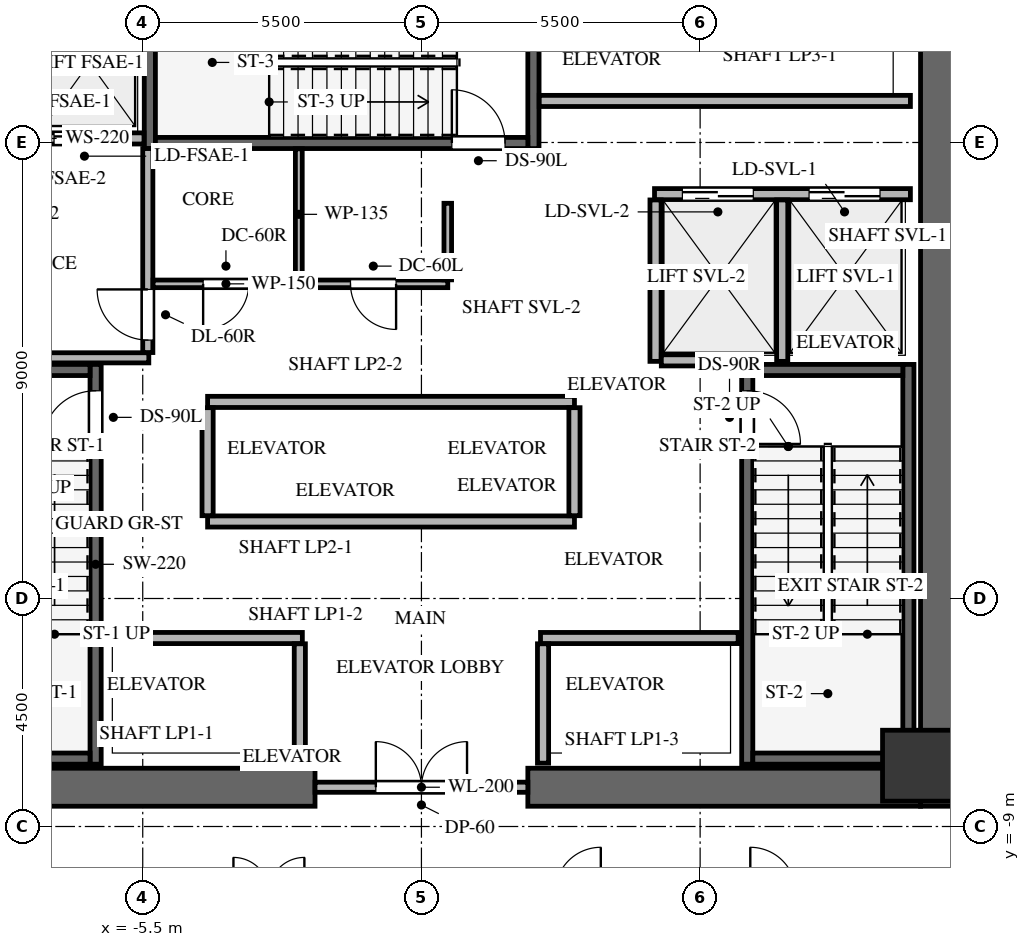
"""IFC4 building model, lengths in metres.
Left out: names, types, materials, properties, quantities, classifications, styles, units other than length and angle.
Written with IfcOpenShell. Run it as: python <this file> out.ifc"""

import sys

from ifc_helpers import new_model, si_unit, direction, frame, frame_2d, origin, origin_2d, place, context, subcontext, project, spatial, rectangle, extrude, source, transform, mapped, element, fill, save


model = new_model("IFC4")
c1 = context("Model", 3, precision=1e-05, world=origin(), true_north=direction((0.0, 1.0)))
c2 = subcontext(c1, "Body", "Model", "MODEL_VIEW")
j1 = project(units=[si_unit("LENGTHUNIT", "METRE"), si_unit("PLANEANGLEUNIT", "RADIAN")], contexts=[c1])
p1 = place(None, origin())
s1 = spatial("IfcSite", under=j1, at=p1, CompositionType="ELEMENT")
p2 = place(p1, origin())
s2 = spatial("IfcBuilding", under=s1, at=p2, CompositionType="ELEMENT")
p3 = place(p2, frame((0.0, 0.0, 88.5)))
s3 = spatial("IfcBuildingStorey", under=s2, at=p3, CompositionType="ELEMENT", Elevation=88.5)
p4 = place(p3, frame((10.225, -8.6, 0.0), z_axis=(0.0, 0.0, 1.0), x_axis=(0.0, 1.0, 0.0)))
e1 = element("IfcWall", 1, at=p4, inside=s3, PredefinedType="SHEAR", context=c2, shape_type="SweptSolid", body=[
    extrude(rectangle(XDim=17.2, YDim=0.75, at=frame_2d((8.6, 0.0))), origin(), (0.0, 0.0, 1.0), 4.8),
])
for number, where, z_axis, x_axis in (
    (2, (-9.85, -8.225, 0.0), (0.0, 0.0, 1.0), (1.0, 0.0, 0.0)),
    (3, (2.1, -8.225, 0.0), (0.0, 0.0, 1.0), (1.0, 0.0, 0.0)),
):
    element("IfcWall", number, at=place(p3, frame(where, z_axis=z_axis, x_axis=x_axis)), inside=s3, PredefinedType="SHEAR", context=c2, shape_type="SweptSolid", body=[
        extrude(rectangle(XDim=7.75, YDim=0.75, at=frame_2d((3.875, 0.0))), origin(), (0.0, 0.0, 1.0), 4.8),
    ])
p5 = place(p3, frame((-6.43, -7.77, -0.3), z_axis=(0.0, 0.0, 1.0), x_axis=(0.0, 1.0, 0.0)))
e4 = element("IfcWall", 4, at=p5, inside=s3, PredefinedType="SHEAR", context=c2, shape_type="SweptSolid", body=[
    extrude(rectangle(XDim=7.89, YDim=0.22, at=frame_2d((3.945, 0.0))), origin(), (0.0, 0.0, 1.0), 4.8),
])
p6 = place(p5, frame((6.32, 0.0, 0.0)))
e5 = element("IfcOpeningElement", 5, at=p6, cuts=e4, PredefinedType="OPENING", context=c2, shape_type="SweptSolid", body=[
    extrude(rectangle(XDim=1.05, YDim=2.15, at=frame_2d((0.525, 1.075))), frame((0.0, 0.12, 0.0), z_axis=(0.0, -1.0, 0.0), x_axis=(1.0, 0.0, 0.0)), (0.0, 0.0, 1.0), 0.24),
])
for number, where, z_axis, x_axis in (
    (6, (-9.5, -7.66, -0.3), (0.0, 0.0, 1.0), (1.0, 0.0, 0.0)),
    (7, (-6.54, 0.01, -0.3), (0.0, 0.0, 1.0), (-1.0, 0.0, 0.0)),
):
    element("IfcWall", number, at=place(p3, frame(where, z_axis=z_axis, x_axis=x_axis)), inside=s3, PredefinedType="SHEAR", context=c2, shape_type="SweptSolid", body=[
        extrude(rectangle(XDim=2.96, YDim=0.22, at=frame_2d((1.48, 0.0))), origin(), (0.0, 0.0, 1.0), 4.8),
    ])
p7 = place(p3, frame((9.61, -7.77, -0.3), z_axis=(0.0, 0.0, 1.0), x_axis=(0.0, 1.0, 0.0)))
e8 = element("IfcWall", 8, at=p7, inside=s3, PredefinedType="SHEAR", context=c2, shape_type="SweptSolid", body=[
    extrude(rectangle(XDim=7.89, YDim=0.22, at=frame_2d((3.945, 0.0))), origin(), (0.0, 0.0, 1.0), 4.8),
])
p8 = place(p3, frame((6.43, 0.12, -0.3), z_axis=(0.0, 0.0, 1.0), x_axis=(0.0, -1.0, 0.0)))
e9 = element("IfcWall", 9, at=p8, inside=s3, PredefinedType="SHEAR", context=c2, shape_type="SweptSolid", body=[
    extrude(rectangle(XDim=7.89, YDim=0.22, at=frame_2d((3.945, 0.0))), origin(), (0.0, 0.0, 1.0), 4.8),
])
p9 = place(p8, frame((0.52, 0.0, 0.0)))
e10 = element("IfcOpeningElement", 10, at=p9, cuts=e9, PredefinedType="OPENING", context=c2, shape_type="SweptSolid", body=[
    extrude(rectangle(XDim=1.05, YDim=2.15, at=frame_2d((0.525, 1.075))), frame((0.0, 0.12, 0.0), z_axis=(0.0, -1.0, 0.0), x_axis=(1.0, 0.0, 0.0)), (0.0, 0.0, 1.0), 0.24),
])
for number, where, z_axis, x_axis in (
    (11, (6.54, -7.66, -0.3), (0.0, 0.0, 1.0), (1.0, 0.0, 0.0)),
    (12, (9.5, 0.01, -0.3), (0.0, 0.0, 1.0), (-1.0, 0.0, 0.0)),
):
    element("IfcWall", number, at=place(p3, frame(where, z_axis=z_axis, x_axis=x_axis)), inside=s3, PredefinedType="SHEAR", context=c2, shape_type="SweptSolid", body=[
        extrude(rectangle(XDim=2.96, YDim=0.22, at=frame_2d((1.48, 0.0))), origin(), (0.0, 0.0, 1.0), 4.8),
    ])
for number, where, z_axis, x_axis in (
    (13, (2.21, 4.38, -0.3), (0.0, 0.0, 1.0), (0.0, 1.0, 0.0)),
    (14, (-5.36, 7.78, -0.3), (0.0, 0.0, 1.0), (0.0, -1.0, 0.0)),
):
    element("IfcWall", number, at=place(p3, frame(where, z_axis=z_axis, x_axis=x_axis)), inside=s3, PredefinedType="SHEAR", context=c2, shape_type="SweptSolid", body=[
        extrude(rectangle(XDim=3.4, YDim=0.22, at=frame_2d((1.7, 0.0))), origin(), (0.0, 0.0, 1.0), 4.8),
    ])
p10 = place(p3, frame((-5.25, 4.49, -0.3), z_axis=(0.0, 0.0, 1.0), x_axis=(1.0, 0.0, 0.0)))
e15 = element("IfcWall", 15, at=p10, inside=s3, PredefinedType="SHEAR", context=c2, shape_type="SweptSolid", body=[
    extrude(rectangle(XDim=7.35, YDim=0.22, at=frame_2d((3.675, 0.0))), origin(), (0.0, 0.0, 1.0), 4.8),
])
p11 = place(p10, frame((5.85, 0.0, 0.0)))
e16 = element("IfcOpeningElement", 16, at=p11, cuts=e15, PredefinedType="OPENING", context=c2, shape_type="SweptSolid", body=[
    extrude(rectangle(XDim=1.05, YDim=2.15, at=frame_2d((0.525, 1.075))), frame((0.0, 0.12, 0.0), z_axis=(0.0, -1.0, 0.0), x_axis=(1.0, 0.0, 0.0)), (0.0, 0.0, 1.0), 0.24),
])
m1 = source(origin(), c2, "Body", "SweptSolid", [
    extrude(rectangle(XDim=1.4, YDim=1.4, at=origin_2d()), origin(), (0.0, 0.0, 1.0), 4.8),
])
p12 = place(p3, frame((9.8, -7.8, -0.3), z_axis=(0.0, 0.0, 1.0), x_axis=(1.0, 0.0, 0.0)))
e17 = element("IfcColumn", 17, at=p12, inside=s3, PredefinedType="COLUMN", context=c2, shape_type="MappedRepresentation", body=[
    mapped(m1, transform((0.0, 0.0, 0.0), x_axis=(1.0, 0.0, 0.0), y_axis=(0.0, 1.0, 0.0), z_axis=(0.0, 0.0, 1.0), scale=1.0)),
])
p13 = place(p3, frame((-2.1, -8.225, 0.0), z_axis=(0.0, 0.0, 1.0), x_axis=(1.0, 0.0, 0.0)))
e18 = element("IfcWall", 18, at=p13, inside=s3, PredefinedType="SOLIDWALL", context=c2, shape_type="SweptSolid", body=[
    extrude(rectangle(XDim=4.2, YDim=0.2, at=frame_2d((2.1, 0.0))), origin(), (0.0, 0.0, 1.0), 4.485),
])
p14 = place(p13, frame((1.2, 0.0, 0.0)))
e19 = element("IfcOpeningElement", 19, at=p14, cuts=e18, PredefinedType="OPENING", context=c2, shape_type="SweptSolid", body=[
    extrude(rectangle(XDim=1.8, YDim=2.15, at=frame_2d((0.9, 1.075))), frame((0.0, 0.11, 0.0), z_axis=(0.0, -1.0, 0.0), x_axis=(1.0, 0.0, 0.0)), (0.0, 0.0, 1.0), 0.22),
])
p15 = place(p3, frame((-9.65, 4.58, 0.0), z_axis=(0.0, 0.0, 1.0), x_axis=(1.0, 0.0, 0.0)))
e20 = element("IfcWall", 20, at=p15, inside=s3, PredefinedType="SOLIDWALL", context=c2, shape_type="SweptSolid", body=[
    extrude(rectangle(XDim=4.175, YDim=0.22, at=frame_2d((2.087, 0.0))), origin(), (0.0, 0.0, 1.0), 4.485),
])
p16 = place(p15, frame((0.4, 0.0, 0.0)))
e21 = element("IfcOpeningElement", 21, at=p16, cuts=e20, PredefinedType="OPENING", context=c2, shape_type="SweptSolid", body=[
    extrude(rectangle(XDim=1.2, YDim=2.15, at=frame_2d((0.6, 1.075))), frame((0.0, 0.12, 0.0), z_axis=(0.0, -1.0, 0.0), x_axis=(1.0, 0.0, 0.0)), (0.0, 0.0, 1.0), 0.24),
])
p17 = place(p15, frame((2.4, 0.0, 0.0)))
e22 = element("IfcOpeningElement", 22, at=p17, cuts=e20, PredefinedType="OPENING", context=c2, shape_type="SweptSolid", body=[
    extrude(rectangle(XDim=1.2, YDim=2.15, at=frame_2d((0.6, 1.075))), frame((0.0, 0.12, 0.0), z_axis=(0.0, -1.0, 0.0), x_axis=(1.0, 0.0, 0.0)), (0.0, 0.0, 1.0), 0.24),
])
p18 = place(p3, frame((-9.65, 0.25, 0.0), z_axis=(0.0, 0.0, 1.0), x_axis=(1.0, 0.0, 0.0)))
e23 = element("IfcWall", 23, at=p18, inside=s3, PredefinedType="SOLIDWALL", context=c2, shape_type="SweptSolid", body=[
    extrude(rectangle(XDim=4.27, YDim=0.2, at=frame_2d((2.135, 0.0))), origin(), (0.0, 0.0, 1.0), 4.485),
])
p19 = place(p3, frame((-5.4, 0.354, 0.0), z_axis=(0.0, 0.0, 1.0), x_axis=(0.0, 1.0, 0.0)))
e24 = element("IfcWall", 24, at=p19, inside=s3, PredefinedType="SOLIDWALL", context=c2, shape_type="SweptSolid", body=[
    extrude(rectangle(XDim=4.026, YDim=0.2, at=frame_2d((2.013, 0.0))), origin(), (0.0, 0.0, 1.0), 4.485),
])
p20 = place(p19, frame((0.246, 0.0, 0.0)))
e25 = element("IfcOpeningElement", 25, at=p20, cuts=e24, PredefinedType="OPENING", context=c2, shape_type="SweptSolid", body=[
    extrude(rectangle(XDim=1.0, YDim=2.15, at=frame_2d((0.5, 1.075))), frame((0.0, 0.11, 0.0), z_axis=(0.0, -1.0, 0.0), x_axis=(1.0, 0.0, 0.0)), (0.0, 0.0, 1.0), 0.22),
])
p21 = place(p3, frame((4.6, 3.48, 0.0), z_axis=(0.0, 0.0, 1.0), x_axis=(1.0, 0.0, 0.0)))
e26 = element("IfcWall", 26, at=p21, inside=s3, PredefinedType="SOLIDWALL", context=c2, shape_type="SweptSolid", body=[
    extrude(rectangle(XDim=5.05, YDim=0.22, at=frame_2d((2.525, 0.0))), origin(), (0.0, 0.0, 1.0), 4.485),
])
p22 = place(p21, frame((0.55, 0.0, 0.0)))
e27 = element("IfcOpeningElement", 27, at=p22, cuts=e26, PredefinedType="OPENING", context=c2, shape_type="SweptSolid", body=[
    extrude(rectangle(XDim=1.4, YDim=2.15, at=frame_2d((0.7, 1.075))), frame((0.0, 0.12, 0.0), z_axis=(0.0, -1.0, 0.0), x_axis=(1.0, 0.0, 0.0)), (0.0, 0.0, 1.0), 0.24),
])
p23 = place(p21, frame((3.05, 0.0, 0.0)))
e28 = element("IfcOpeningElement", 28, at=p23, cuts=e26, PredefinedType="OPENING", context=c2, shape_type="SweptSolid", body=[
    extrude(rectangle(XDim=1.4, YDim=2.15, at=frame_2d((0.7, 1.075))), frame((0.0, 0.12, 0.0), z_axis=(0.0, -1.0, 0.0), x_axis=(1.0, 0.0, 0.0)), (0.0, 0.0, 1.0), 0.24),
])
for number, where, z_axis, x_axis in (
    (29, (4.62, 0.18, 0.0), (0.0, 0.0, 1.0), (0.0, 1.0, 0.0)),
    (30, (7.12, 0.18, 0.0), (0.0, 0.0, 1.0), (0.0, 1.0, 0.0)),
):
    element("IfcWall", number, at=place(p3, frame(where, z_axis=z_axis, x_axis=x_axis)), inside=s3, PredefinedType="SOLIDWALL", context=c2, shape_type="SweptSolid", body=[
        extrude(rectangle(XDim=3.186, YDim=0.22, at=frame_2d((1.593, 0.0))), origin(), (0.0, 0.0, 1.0), 4.485),
    ])
p24 = place(p3, frame((4.734, 0.2, 0.0), z_axis=(0.0, 0.0, 1.0), x_axis=(1.0, 0.0, 0.0)))
e31 = element("IfcWall", 31, at=p24, inside=s3, PredefinedType="SOLIDWALL", context=c2, shape_type="SweptSolid", body=[
    extrude(rectangle(XDim=1.666, YDim=0.22, at=frame_2d((0.833, 0.0))), origin(), (0.0, 0.0, 1.0), 4.485),
])
for number, where, z_axis, x_axis in (
    (32, (-6.25, -5.28, 0.0), (0.0, 0.0, 1.0), (1.0, 0.0, 0.0)),
    (33, (2.35, -5.28, 0.0), (0.0, 0.0, 1.0), (1.0, 0.0, 0.0)),
):
    element("IfcWall", number, at=place(p3, frame(where, z_axis=z_axis, x_axis=x_axis)), inside=s3, PredefinedType="SOLIDWALL", context=c2, shape_type="SweptSolid", body=[
        extrude(rectangle(XDim=3.9, YDim=0.22, at=frame_2d((1.95, 0.0))), origin(), (0.0, 0.0, 1.0), 4.485),
    ])
for number, where, z_axis, x_axis in (
    (34, (-2.4, -7.75, 0.0), (0.0, 0.0, 1.0), (0.0, 1.0, 0.0)),
    (35, (2.4, -7.75, 0.0), (0.0, 0.0, 1.0), (0.0, 1.0, 0.0)),
):
    element("IfcWall", number, at=place(p3, frame(where, z_axis=z_axis, x_axis=x_axis)), inside=s3, PredefinedType="SOLIDWALL", context=c2, shape_type="SweptSolid", body=[
        extrude(rectangle(XDim=2.356, YDim=0.22, at=frame_2d((1.178, 0.0))), origin(), (0.0, 0.0, 1.0), 4.485),
    ])
for number, where, z_axis, x_axis in (
    (36, (-4.22, -2.98, 0.0), (0.0, 0.0, 1.0), (1.0, 0.0, 0.0)),
    (37, (-4.22, -0.62, 0.0), (0.0, 0.0, 1.0), (1.0, 0.0, 0.0)),
):
    element("IfcWall", number, at=place(p3, frame(where, z_axis=z_axis, x_axis=x_axis)), inside=s3, PredefinedType="SOLIDWALL", context=c2, shape_type="SweptSolid", body=[
        extrude(rectangle(XDim=7.24, YDim=0.22, at=frame_2d((3.62, 0.0))), origin(), (0.0, 0.0, 1.0), 4.485),
    ])
for number, where, z_axis, x_axis in (
    (38, (-4.22, -2.866, 0.0), (0.0, 0.0, 1.0), (0.0, 1.0, 0.0)),
    (39, (3.02, -2.866, 0.0), (0.0, 0.0, 1.0), (0.0, 1.0, 0.0)),
):
    element("IfcWall", number, at=place(p3, frame(where, z_axis=z_axis, x_axis=x_axis)), inside=s3, PredefinedType="SOLIDWALL", context=c2, shape_type="SweptSolid", body=[
        extrude(rectangle(XDim=2.132, YDim=0.22, at=frame_2d((1.066, 0.0))), origin(), (0.0, 0.0, 1.0), 4.485),
    ])
p25 = place(p3, frame((2.325, 5.32, 0.0), z_axis=(0.0, 0.0, 1.0), x_axis=(1.0, 0.0, 0.0)))
e40 = element("IfcWall", 40, at=p25, inside=s3, PredefinedType="SOLIDWALL", context=c2, shape_type="SweptSolid", body=[
    extrude(rectangle(XDim=7.325, YDim=0.22, at=frame_2d((3.663, 0.0))), origin(), (0.0, 0.0, 1.0), 4.485),
])
p26 = place(p3, frame((-2.42, 1.71, 0.0), z_axis=(0.0, 0.0, 1.0), x_axis=(-1.0, 0.0, 0.0)))
e41 = element("IfcWall", 41, at=p26, inside=s3, PredefinedType="PARTITIONING", context=c2, shape_type="SweptSolid", body=[
    extrude(rectangle(XDim=2.876, YDim=0.15, at=frame_2d((1.438, 0.0))), origin(), (0.0, 0.0, 1.0), 4.485),
])
p27 = place(p26, frame((0.988, 0.0, 0.0)))
e42 = element("IfcOpeningElement", 42, at=p27, cuts=e41, PredefinedType="OPENING", context=c2, shape_type="SweptSolid", body=[
    extrude(rectangle(XDim=0.9, YDim=2.05, at=frame_2d((0.45, 1.025))), frame((0.0, 0.085, 0.0), z_axis=(0.0, -1.0, 0.0), x_axis=(1.0, 0.0, 0.0)), (0.0, 0.0, 1.0), 0.17),
])
p28 = place(p3, frame((0.52, 1.71, 0.0), z_axis=(0.0, 0.0, 1.0), x_axis=(-1.0, 0.0, 0.0)))
e43 = element("IfcWall", 43, at=p28, inside=s3, PredefinedType="PARTITIONING", context=c2, shape_type="SweptSolid", body=[
    extrude(rectangle(XDim=2.94, YDim=0.15, at=frame_2d((1.47, 0.0))), origin(), (0.0, 0.0, 1.0), 4.485),
])
p29 = place(p28, frame((1.02, 0.0, 0.0)))
e44 = element("IfcOpeningElement", 44, at=p29, cuts=e43, PredefinedType="OPENING", context=c2, shape_type="SweptSolid", body=[
    extrude(rectangle(XDim=0.9, YDim=2.05, at=frame_2d((0.45, 1.025))), frame((0.0, 0.085, 0.0), z_axis=(0.0, -1.0, 0.0), x_axis=(1.0, 0.0, 0.0)), (0.0, 0.0, 1.0), 0.17),
])
p30 = place(p3, frame((0.52, 3.3, 0.0), z_axis=(0.0, 0.0, 1.0), x_axis=(0.0, -1.0, 0.0)))
e45 = element("IfcWall", 45, at=p30, inside=s3, PredefinedType="PARTITIONING", context=c2, shape_type="SweptSolid", body=[
    extrude(rectangle(XDim=1.511, YDim=0.15, at=frame_2d((0.755, 0.0))), origin(), (0.0, 0.0, 1.0), 4.485),
])
p31 = place(p3, frame((-2.42, 4.375, 0.0), z_axis=(0.0, 0.0, 1.0), x_axis=(0.0, -1.0, 0.0)))
e46 = element("IfcWall", 46, at=p31, inside=s3, PredefinedType="PARTITIONING", context=c2, shape_type="SweptSolid", body=[
    extrude(rectangle(XDim=2.586, YDim=0.135, at=frame_2d((1.293, 0.0))), origin(), (0.0, 0.0, 1.0), 4.485),
])
m2 = source(origin(), c2, "Body", "SweptSolid", [
    extrude(rectangle(XDim=1.05, YDim=2.15, at=frame_2d((0.525, 1.075))), frame((0.0, 0.025, 0.0), z_axis=(0.0, -1.0, 0.0), x_axis=(1.0, 0.0, 0.0)), (0.0, 0.0, 1.0), 0.05),
])
p32 = place(p6, origin())
e47 = element("IfcDoor", 47, at=p32, inside=s3, OperationType="SINGLE_SWING_LEFT", PredefinedType="DOOR", context=c2, shape_type="MappedRepresentation", body=[
    mapped(m2, transform((0.0, 0.0, 0.0), x_axis=(1.0, 0.0, 0.0), y_axis=(0.0, 1.0, 0.0), z_axis=(0.0, 0.0, 1.0), scale=1.0)),
])
fill(e5, e47)
m3 = source(origin(), c2, "Body", "SweptSolid", [
    extrude(rectangle(XDim=1.05, YDim=2.15, at=frame_2d((0.525, 1.075))), frame((0.0, 0.025, 0.0), z_axis=(0.0, -1.0, 0.0), x_axis=(1.0, 0.0, 0.0)), (0.0, 0.0, 1.0), 0.05),
])
p33 = place(p9, origin())
e48 = element("IfcDoor", 48, at=p33, inside=s3, OperationType="SINGLE_SWING_RIGHT", PredefinedType="DOOR", context=c2, shape_type="MappedRepresentation", body=[
    mapped(m3, transform((0.0, 0.0, 0.0), x_axis=(1.0, 0.0, 0.0), y_axis=(0.0, 1.0, 0.0), z_axis=(0.0, 0.0, 1.0), scale=1.0)),
])
fill(e10, e48)
p34 = place(p11, origin())
e49 = element("IfcDoor", 49, at=p34, inside=s3, OperationType="SINGLE_SWING_LEFT", PredefinedType="DOOR", context=c2, shape_type="MappedRepresentation", body=[
    mapped(m2, transform((0.0, 0.0, 0.0), x_axis=(1.0, 0.0, 0.0), y_axis=(0.0, 1.0, 0.0), z_axis=(0.0, 0.0, 1.0), scale=1.0)),
])
fill(e16, e49)
m4 = source(origin(), c2, "Body", "SweptSolid", [
    extrude(rectangle(XDim=1.8, YDim=2.15, at=frame_2d((0.9, 1.075))), frame((0.0, 0.025, 0.0), z_axis=(0.0, -1.0, 0.0), x_axis=(1.0, 0.0, 0.0)), (0.0, 0.0, 1.0), 0.05),
])
p35 = place(p14, origin())
e50 = element("IfcDoor", 50, at=p35, inside=s3, OperationType="DOUBLE_DOOR_SINGLE_SWING", PredefinedType="DOOR", context=c2, shape_type="MappedRepresentation", body=[
    mapped(m4, transform((0.0, 0.0, 0.0), x_axis=(1.0, 0.0, 0.0), y_axis=(0.0, 1.0, 0.0), z_axis=(0.0, 0.0, 1.0), scale=1.0)),
])
fill(e19, e50)
m5 = source(origin(), c2, "Body", "SweptSolid", [
    extrude(rectangle(XDim=1.2, YDim=2.15, at=frame_2d((0.6, 1.075))), frame((0.0, 0.025, 0.0), z_axis=(0.0, -1.0, 0.0), x_axis=(1.0, 0.0, 0.0)), (0.0, 0.0, 1.0), 0.05),
])
p36 = place(p17, origin())
e51 = element("IfcDoor", 51, at=p36, inside=s3, OperationType="DOUBLE_DOOR_SLIDING", PredefinedType="DOOR", context=c2, shape_type="MappedRepresentation", body=[
    mapped(m5, transform((0.0, 0.0, 0.0), x_axis=(1.0, 0.0, 0.0), y_axis=(0.0, 1.0, 0.0), z_axis=(0.0, 0.0, 1.0), scale=1.0)),
])
fill(e22, e51)
m6 = source(origin(), c2, "Body", "SweptSolid", [
    extrude(rectangle(XDim=1.0, YDim=2.15, at=frame_2d((0.5, 1.075))), frame((0.0, 0.025, 0.0), z_axis=(0.0, -1.0, 0.0), x_axis=(1.0, 0.0, 0.0)), (0.0, 0.0, 1.0), 0.05),
])
p37 = place(p20, origin())
e52 = element("IfcDoor", 52, at=p37, inside=s3, OperationType="SINGLE_SWING_RIGHT", PredefinedType="DOOR", context=c2, shape_type="MappedRepresentation", body=[
    mapped(m6, transform((0.0, 0.0, 0.0), x_axis=(1.0, 0.0, 0.0), y_axis=(0.0, 1.0, 0.0), z_axis=(0.0, 0.0, 1.0), scale=1.0)),
])
fill(e25, e52)
m7 = source(origin(), c2, "Body", "SweptSolid", [
    extrude(rectangle(XDim=1.4, YDim=2.15, at=frame_2d((0.7, 1.075))), frame((0.0, 0.025, 0.0), z_axis=(0.0, -1.0, 0.0), x_axis=(1.0, 0.0, 0.0)), (0.0, 0.0, 1.0), 0.05),
])
p38 = place(p22, origin())
e53 = element("IfcDoor", 53, at=p38, inside=s3, OperationType="DOUBLE_DOOR_SLIDING", PredefinedType="DOOR", context=c2, shape_type="MappedRepresentation", body=[
    mapped(m7, transform((0.0, 0.0, 0.0), x_axis=(1.0, 0.0, 0.0), y_axis=(0.0, 1.0, 0.0), z_axis=(0.0, 0.0, 1.0), scale=1.0)),
])
fill(e27, e53)
p39 = place(p23, origin())
e54 = element("IfcDoor", 54, at=p39, inside=s3, OperationType="DOUBLE_DOOR_SLIDING", PredefinedType="DOOR", context=c2, shape_type="MappedRepresentation", body=[
    mapped(m7, transform((0.0, 0.0, 0.0), x_axis=(1.0, 0.0, 0.0), y_axis=(0.0, 1.0, 0.0), z_axis=(0.0, 0.0, 1.0), scale=1.0)),
])
fill(e28, e54)
m8 = source(origin(), c2, "Body", "SweptSolid", [
    extrude(rectangle(XDim=0.9, YDim=2.05, at=frame_2d((0.45, 1.025))), frame((0.0, 0.025, 0.0), z_axis=(0.0, -1.0, 0.0), x_axis=(1.0, 0.0, 0.0)), (0.0, 0.0, 1.0), 0.05),
])
p40 = place(p27, origin())
e55 = element("IfcDoor", 55, at=p40, inside=s3, OperationType="SINGLE_SWING_RIGHT", PredefinedType="DOOR", context=c2, shape_type="MappedRepresentation", body=[
    mapped(m8, transform((0.0, 0.0, 0.0), x_axis=(1.0, 0.0, 0.0), y_axis=(0.0, 1.0, 0.0), z_axis=(0.0, 0.0, 1.0), scale=1.0)),
])
fill(e42, e55)
m9 = source(origin(), c2, "Body", "SweptSolid", [
    extrude(rectangle(XDim=0.9, YDim=2.05, at=frame_2d((0.45, 1.025))), frame((0.0, 0.025, 0.0), z_axis=(0.0, -1.0, 0.0), x_axis=(1.0, 0.0, 0.0)), (0.0, 0.0, 1.0), 0.05),
])
p41 = place(p29, origin())
e56 = element("IfcDoor", 56, at=p41, inside=s3, OperationType="SINGLE_SWING_LEFT", PredefinedType="DOOR", context=c2, shape_type="MappedRepresentation", body=[
    mapped(m9, transform((0.0, 0.0, 0.0), x_axis=(1.0, 0.0, 0.0), y_axis=(0.0, 1.0, 0.0), z_axis=(0.0, 0.0, 1.0), scale=1.0)),
])
fill(e44, e56)
save(model, sys.argv[1])
